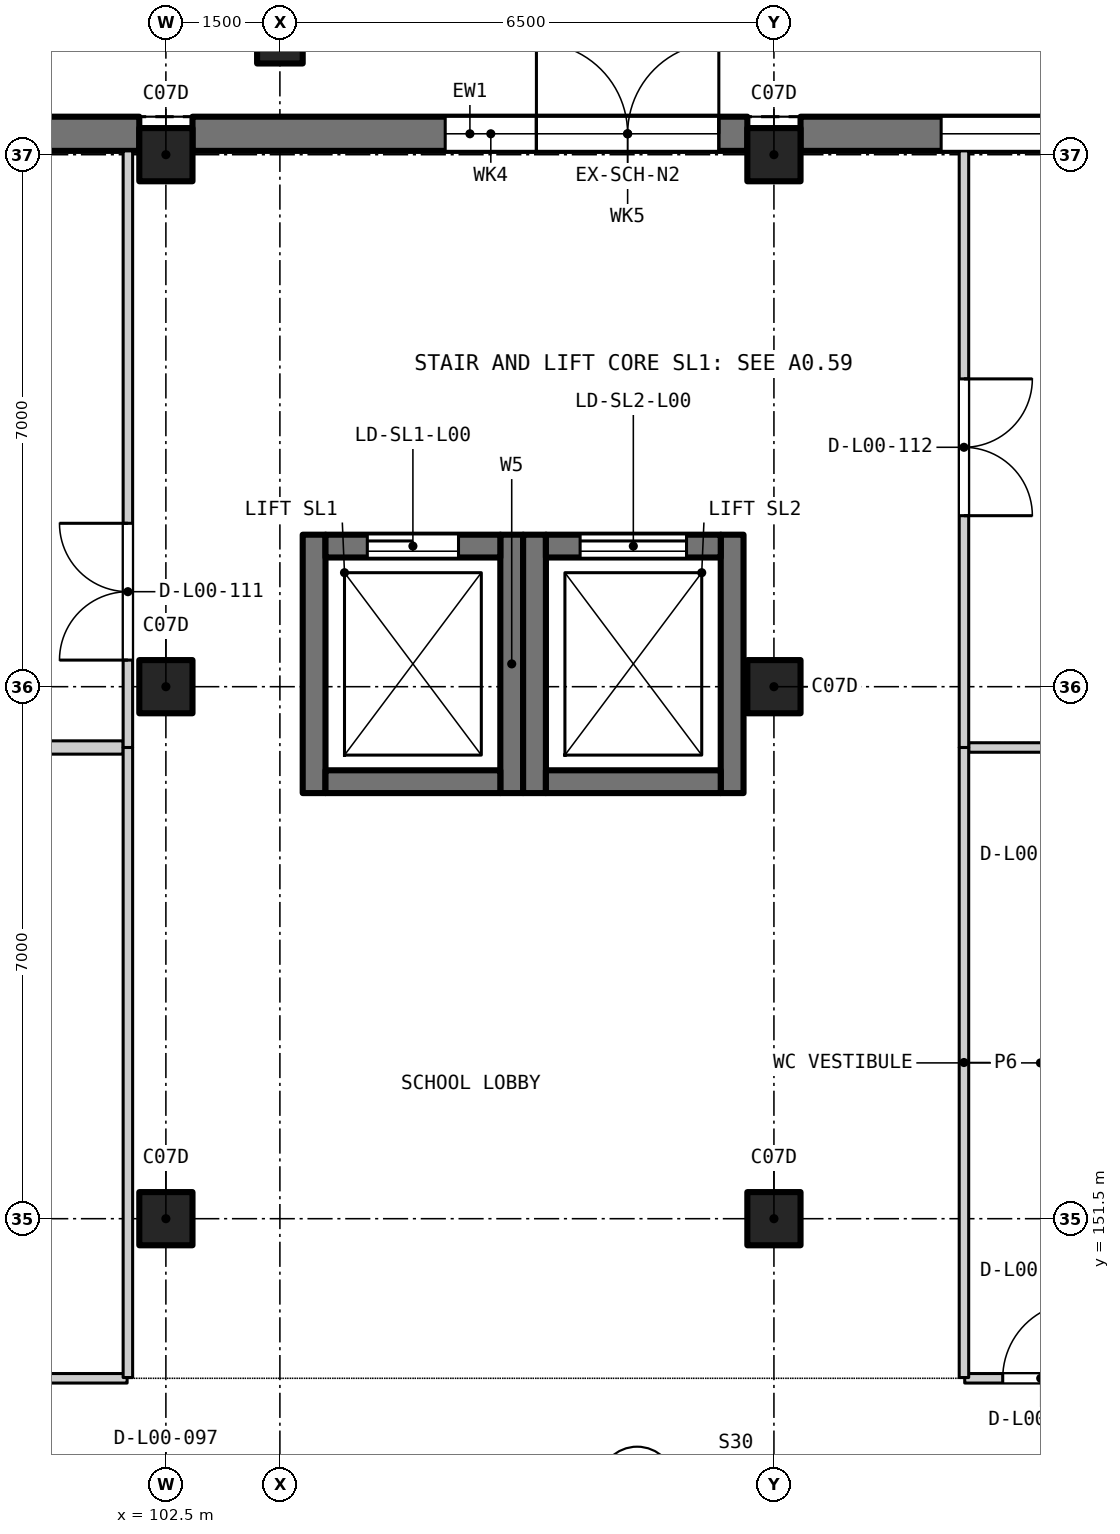
"""IFC4 building model, lengths in metres.
Left out: names, types, materials, properties, quantities, classifications, styles, units other than length and angle.
Written with IfcOpenShell. Run it as: python <this file> out.ifc"""

import sys

from ifc_helpers import new_model, si_unit, direction, frame, frame_2d, origin, origin_2d, place, context, subcontext, project, spatial, rectangle, extrude, element, fill, save


model = new_model("IFC4")
c1 = context("Model", 3, precision=1e-05, world=origin(), true_north=direction((0.0, 1.0)))
c2 = subcontext(c1, "Body", "Model", "MODEL_VIEW")
j1 = project(units=[si_unit("LENGTHUNIT", "METRE"), si_unit("PLANEANGLEUNIT", "RADIAN")], contexts=[c1])
p1 = place(None, origin())
s1 = spatial("IfcSite", under=j1, at=p1, CompositionType="ELEMENT")
p2 = place(p1, origin())
s2 = spatial("IfcBuilding", under=s1, at=p2, CompositionType="ELEMENT")
p3 = place(p2, origin())
s3 = spatial("IfcBuildingStorey", under=s2, at=p3, CompositionType="ELEMENT", Elevation=0.0)
for number, where, z_axis, x_axis in (
    (1, (102.5, 151.5, -1.4), (0.0, 0.0, 1.0), (1.0, 0.0, 0.0)),
    (2, (102.5, 158.5, -1.4), (0.0, 0.0, 1.0), (1.0, 0.0, 0.0)),
    (3, (102.5, 165.5, -1.4), (0.0, 0.0, 1.0), (1.0, 0.0, 0.0)),
    (4, (110.5, 151.5, -1.4), (0.0, 0.0, 1.0), (1.0, 0.0, 0.0)),
    (5, (110.5, 158.5, -1.4), (0.0, 0.0, 1.0), (1.0, 0.0, 0.0)),
    (6, (110.5, 165.5, -1.4), (0.0, 0.0, 1.0), (1.0, 0.0, 0.0)),
):
    element("IfcColumn", number, at=place(p3, frame(where, z_axis=z_axis, x_axis=x_axis)), inside=s3, PredefinedType="COLUMN", context=c2, shape_type="SweptSolid", body=[
        extrude(rectangle(XDim=0.7, YDim=0.7, at=origin_2d()), origin(), (0.0, 0.0, 1.0), 7.4),
    ])
p4 = place(p3, frame((104.0, 167.0, -0.3), z_axis=(0.0, 0.0, 1.0), x_axis=(1.0, 0.0, 0.0)))
e7 = element("IfcColumn", 7, at=p4, inside=s3, PredefinedType="COLUMN", context=c2, shape_type="SweptSolid", body=[
    extrude(rectangle(XDim=0.6, YDim=0.6, at=origin_2d()), origin(), (0.0, 0.0, 1.0), 6.15),
])
for number, where, z_axis, x_axis in (
    (8, (104.45, 157.1, -1.4), (0.0, 0.0, 1.0), (0.0, 1.0, 0.0)),
    (9, (107.05, 157.1, -1.4), (0.0, 0.0, 1.0), (0.0, 1.0, 0.0)),
):
    element("IfcWall", number, at=place(p3, frame(where, z_axis=z_axis, x_axis=x_axis)), inside=s3, PredefinedType="SHEAR", context=c2, shape_type="SweptSolid", body=[
        extrude(rectangle(XDim=3.4, YDim=0.3, at=frame_2d((1.7, 0.0))), origin(), (0.0, 0.0, 1.0), 7.4),
    ])
p5 = place(p3, frame((104.6, 157.25, -1.4), z_axis=(0.0, 0.0, 1.0), x_axis=(1.0, 0.0, 0.0)))
e10 = element("IfcWall", 10, at=p5, inside=s3, PredefinedType="SHEAR", context=c2, shape_type="SweptSolid", body=[
    extrude(rectangle(XDim=2.3, YDim=0.3, at=frame_2d((1.15, 0.0))), origin(), (0.0, 0.0, 1.0), 7.4),
])
p6 = place(p3, frame((104.6, 160.35, -1.4), z_axis=(0.0, 0.0, 1.0), x_axis=(1.0, 0.0, 0.0)))
e11 = element("IfcWall", 11, at=p6, inside=s3, PredefinedType="SHEAR", context=c2, shape_type="SweptSolid", body=[
    extrude(rectangle(XDim=2.3, YDim=0.3, at=frame_2d((1.15, 0.0))), origin(), (0.0, 0.0, 1.0), 7.4),
])
p7 = place(p6, frame((0.55, 0.0, 1.4)))
e12 = element("IfcOpeningElement", 12, at=p7, cuts=e11, PredefinedType="OPENING", context=c2, shape_type="SweptSolid", body=[
    extrude(rectangle(XDim=1.2, YDim=2.1, at=frame_2d((0.6, 1.05))), frame((0.0, 0.16, 0.0), z_axis=(0.0, -1.0, 0.0), x_axis=(1.0, 0.0, 0.0)), (0.0, 0.0, 1.0), 0.32),
])
for number, where, z_axis, x_axis in (
    (13, (107.35, 157.1, -1.4), (0.0, 0.0, 1.0), (0.0, 1.0, 0.0)),
    (14, (109.95, 157.1, -1.4), (0.0, 0.0, 1.0), (0.0, 1.0, 0.0)),
):
    element("IfcWall", number, at=place(p3, frame(where, z_axis=z_axis, x_axis=x_axis)), inside=s3, PredefinedType="SHEAR", context=c2, shape_type="SweptSolid", body=[
        extrude(rectangle(XDim=3.4, YDim=0.3, at=frame_2d((1.7, 0.0))), origin(), (0.0, 0.0, 1.0), 7.4),
    ])
p8 = place(p3, frame((107.5, 157.25, -1.4), z_axis=(0.0, 0.0, 1.0), x_axis=(1.0, 0.0, 0.0)))
e15 = element("IfcWall", 15, at=p8, inside=s3, PredefinedType="SHEAR", context=c2, shape_type="SweptSolid", body=[
    extrude(rectangle(XDim=2.3, YDim=0.3, at=frame_2d((1.15, 0.0))), origin(), (0.0, 0.0, 1.0), 7.4),
])
p9 = place(p3, frame((107.5, 160.35, -1.4), z_axis=(0.0, 0.0, 1.0), x_axis=(1.0, 0.0, 0.0)))
e16 = element("IfcWall", 16, at=p9, inside=s3, PredefinedType="SHEAR", context=c2, shape_type="SweptSolid", body=[
    extrude(rectangle(XDim=2.3, YDim=0.3, at=frame_2d((1.15, 0.0))), origin(), (0.0, 0.0, 1.0), 7.4),
])
p10 = place(p9, frame((0.45, 0.0, 1.4)))
e17 = element("IfcOpeningElement", 17, at=p10, cuts=e16, PredefinedType="OPENING", context=c2, shape_type="SweptSolid", body=[
    extrude(rectangle(XDim=1.4, YDim=2.1, at=frame_2d((0.7, 1.05))), frame((0.0, 0.16, 0.0), z_axis=(0.0, -1.0, 0.0), x_axis=(1.0, 0.0, 0.0)), (0.0, 0.0, 1.0), 0.32),
])
p11 = place(p3, frame((94.85, 165.775, 0.0), z_axis=(0.0, 0.0, 1.0), x_axis=(1.0, 0.0, 0.0)))
e18 = element("IfcWall", 18, at=p11, inside=s3, PredefinedType="SOLIDWALL", context=c2, shape_type="SweptSolid", body=[
    extrude(rectangle(XDim=7.3, YDim=0.45, at=frame_2d((3.65, 0.0))), origin(), (0.0, 0.0, 1.0), 4.9),
])
p12 = place(p11, frame((2.95, 0.0, 0.0)))
e19 = element("IfcOpeningElement", 19, at=p12, cuts=e18, PredefinedType="OPENING", context=c2, shape_type="SweptSolid", body=[
    extrude(rectangle(XDim=2.4, YDim=2.4, at=frame_2d((1.2, 1.2))), frame((0.0, 0.235, 0.0), z_axis=(0.0, -1.0, 0.0), x_axis=(1.0, 0.0, 0.0)), (0.0, 0.0, 1.0), 0.47),
])
p13 = place(p11, frame((2.95, 0.0, 2.5)))
e20 = element("IfcOpeningElement", 20, at=p13, cuts=e18, PredefinedType="OPENING", context=c2, shape_type="SweptSolid", body=[
    extrude(rectangle(XDim=2.4, YDim=0.6, at=frame_2d((1.2, 0.3))), frame((0.0, 0.235, 0.0), z_axis=(0.0, -1.0, 0.0), x_axis=(1.0, 0.0, 0.0)), (0.0, 0.0, 1.0), 0.47),
])
p14 = place(p11, frame((1.75, 0.0, 0.4)))
e21 = element("IfcOpeningElement", 21, at=p14, cuts=e18, PredefinedType="OPENING", context=c2, shape_type="SweptSolid", body=[
    extrude(rectangle(XDim=1.2, YDim=3.0, at=frame_2d((0.6, 1.5))), frame((0.0, 0.235, 0.0), z_axis=(0.0, -1.0, 0.0), x_axis=(1.0, 0.0, 0.0)), (0.0, 0.0, 1.0), 0.47),
])
p15 = place(p3, frame((102.85, 165.775, 0.0), z_axis=(0.0, 0.0, 1.0), x_axis=(1.0, 0.0, 0.0)))
e22 = element("IfcWall", 22, at=p15, inside=s3, PredefinedType="SOLIDWALL", context=c2, shape_type="SweptSolid", body=[
    extrude(rectangle(XDim=7.3, YDim=0.45, at=frame_2d((3.65, 0.0))), origin(), (0.0, 0.0, 1.0), 4.9),
])
p16 = place(p15, frame((4.525, 0.0, 0.0)))
e23 = element("IfcOpeningElement", 23, at=p16, cuts=e22, PredefinedType="OPENING", context=c2, shape_type="SweptSolid", body=[
    extrude(rectangle(XDim=2.4, YDim=2.4, at=frame_2d((1.2, 1.2))), frame((0.0, 0.235, 0.0), z_axis=(0.0, -1.0, 0.0), x_axis=(1.0, 0.0, 0.0)), (0.0, 0.0, 1.0), 0.47),
])
p17 = place(p15, frame((4.525, 0.0, 2.5)))
e24 = element("IfcOpeningElement", 24, at=p17, cuts=e22, PredefinedType="OPENING", context=c2, shape_type="SweptSolid", body=[
    extrude(rectangle(XDim=2.4, YDim=0.6, at=frame_2d((1.2, 0.3))), frame((0.0, 0.235, 0.0), z_axis=(0.0, -1.0, 0.0), x_axis=(1.0, 0.0, 0.0)), (0.0, 0.0, 1.0), 0.47),
])
p18 = place(p15, frame((3.325, 0.0, 0.4)))
e25 = element("IfcOpeningElement", 25, at=p18, cuts=e22, PredefinedType="OPENING", context=c2, shape_type="SweptSolid", body=[
    extrude(rectangle(XDim=1.2, YDim=3.0, at=frame_2d((0.6, 1.5))), frame((0.0, 0.235, 0.0), z_axis=(0.0, -1.0, 0.0), x_axis=(1.0, 0.0, 0.0)), (0.0, 0.0, 1.0), 0.47),
])
p19 = place(p3, frame((110.85, 165.775, 0.0), z_axis=(0.0, 0.0, 1.0), x_axis=(1.0, 0.0, 0.0)))
e26 = element("IfcWall", 26, at=p19, inside=s3, PredefinedType="SOLIDWALL", context=c2, shape_type="SweptSolid", body=[
    extrude(rectangle(XDim=7.3, YDim=0.45, at=frame_2d((3.65, 0.0))), origin(), (0.0, 0.0, 1.0), 4.9),
])
p20 = place(p19, frame((1.85, 0.0, 0.9)))
e27 = element("IfcOpeningElement", 27, at=p20, cuts=e26, PredefinedType="OPENING", context=c2, shape_type="SweptSolid", body=[
    extrude(rectangle(XDim=3.6, YDim=1.6, at=frame_2d((1.8, 0.8))), frame((0.0, 0.235, 0.0), z_axis=(0.0, -1.0, 0.0), x_axis=(1.0, 0.0, 0.0)), (0.0, 0.0, 1.0), 0.47),
])
p21 = place(p3, frame((89.61, 149.4, 0.0), z_axis=(0.0, 0.0, 1.0), x_axis=(1.0, 0.0, 0.0)))
e28 = element("IfcWall", 28, at=p21, inside=s3, PredefinedType="PARTITIONING", context=c2, shape_type="SweptSolid", body=[
    extrude(rectangle(XDim=12.38, YDim=0.125, at=frame_2d((6.19, 0.0))), origin(), (0.0, 0.0, 1.0), 5.7),
])
p22 = place(p21, frame((5.7, 0.0, 0.0)))
e29 = element("IfcOpeningElement", 29, at=p22, cuts=e28, PredefinedType="OPENING", context=c2, shape_type="SweptSolid", body=[
    extrude(rectangle(XDim=1.0, YDim=2.1, at=frame_2d((0.5, 1.05))), frame((0.0, 0.073, 0.0), z_axis=(0.0, -1.0, 0.0), x_axis=(1.0, 0.0, 0.0)), (0.0, 0.0, 1.0), 0.145),
])
p23 = place(p3, frame((113.01, 149.4, 0.0), z_axis=(0.0, 0.0, 1.0), x_axis=(1.0, 0.0, 0.0)))
e30 = element("IfcWall", 30, at=p23, inside=s3, PredefinedType="PARTITIONING", context=c2, shape_type="SweptSolid", body=[
    extrude(rectangle(XDim=1.99, YDim=0.125, at=frame_2d((0.995, 0.0))), origin(), (0.0, 0.0, 1.0), 5.7),
])
p24 = place(p23, frame((0.5, 0.0, 0.0)))
e31 = element("IfcOpeningElement", 31, at=p24, cuts=e30, PredefinedType="OPENING", context=c2, shape_type="SweptSolid", body=[
    extrude(rectangle(XDim=1.0, YDim=2.1, at=frame_2d((0.5, 1.05))), frame((0.0, 0.073, 0.0), z_axis=(0.0, -1.0, 0.0), x_axis=(1.0, 0.0, 0.0)), (0.0, 0.0, 1.0), 0.145),
])
p25 = place(p3, frame((89.663, 157.7, 0.0), z_axis=(0.0, 0.0, 1.0), x_axis=(1.0, 0.0, 0.0)))
e32 = element("IfcWall", 32, at=p25, inside=s3, PredefinedType="PARTITIONING", context=c2, shape_type="SweptSolid", body=[
    extrude(rectangle(XDim=12.275, YDim=0.175, at=frame_2d((6.137, 0.0))), origin(), (0.0, 0.0, 1.0), 5.7),
])
p26 = place(p3, frame((113.062, 157.7, 0.0), z_axis=(0.0, 0.0, 1.0), x_axis=(1.0, 0.0, 0.0)))
e33 = element("IfcWall", 33, at=p26, inside=s3, PredefinedType="PARTITIONING", context=c2, shape_type="SweptSolid", body=[
    extrude(rectangle(XDim=1.938, YDim=0.125, at=frame_2d((0.969, 0.0))), origin(), (0.0, 0.0, 1.0), 5.7),
])
p27 = place(p3, frame((102.0, 149.41, 0.0), z_axis=(0.0, 0.0, 1.0), x_axis=(0.0, 1.0, 0.0)))
e34 = element("IfcWall", 34, at=p27, inside=s3, PredefinedType="PARTITIONING", context=c2, shape_type="SweptSolid", body=[
    extrude(rectangle(XDim=8.29, YDim=0.125, at=frame_2d((4.145, 0.0))), origin(), (0.0, 0.0, 1.0), 5.7),
])
p28 = place(p3, frame((102.0, 157.7, 0.0), z_axis=(0.0, 0.0, 1.0), x_axis=(0.0, 1.0, 0.0)))
e35 = element("IfcWall", 35, at=p28, inside=s3, PredefinedType="PARTITIONING", context=c2, shape_type="SweptSolid", body=[
    extrude(rectangle(XDim=7.85, YDim=0.125, at=frame_2d((3.925, 0.0))), origin(), (0.0, 0.0, 1.0), 5.7),
])
p29 = place(p28, frame((1.15, 0.0, 0.0)))
e36 = element("IfcOpeningElement", 36, at=p29, cuts=e35, PredefinedType="OPENING", context=c2, shape_type="SweptSolid", body=[
    extrude(rectangle(XDim=1.8, YDim=2.1, at=frame_2d((0.9, 1.05))), frame((0.0, 0.073, 0.0), z_axis=(0.0, -1.0, 0.0), x_axis=(1.0, 0.0, 0.0)), (0.0, 0.0, 1.0), 0.145),
])
p30 = place(p3, frame((113.0, 149.41, 0.0), z_axis=(0.0, 0.0, 1.0), x_axis=(0.0, 1.0, 0.0)))
e37 = element("IfcWall", 37, at=p30, inside=s3, PredefinedType="PARTITIONING", context=c2, shape_type="SweptSolid", body=[
    extrude(rectangle(XDim=8.29, YDim=0.125, at=frame_2d((4.145, 0.0))), origin(), (0.0, 0.0, 1.0), 5.7),
])
p31 = place(p3, frame((113.0, 157.7, 0.0), z_axis=(0.0, 0.0, 1.0), x_axis=(0.0, 1.0, 0.0)))
e38 = element("IfcWall", 38, at=p31, inside=s3, PredefinedType="PARTITIONING", context=c2, shape_type="SweptSolid", body=[
    extrude(rectangle(XDim=7.85, YDim=0.125, at=frame_2d((3.925, 0.0))), origin(), (0.0, 0.0, 1.0), 5.7),
])
p32 = place(p31, frame((3.05, 0.0, 0.0)))
e39 = element("IfcOpeningElement", 39, at=p32, cuts=e38, PredefinedType="OPENING", context=c2, shape_type="SweptSolid", body=[
    extrude(rectangle(XDim=1.8, YDim=2.1, at=frame_2d((0.9, 1.05))), frame((0.0, 0.073, 0.0), z_axis=(0.0, -1.0, 0.0), x_axis=(1.0, 0.0, 0.0)), (0.0, 0.0, 1.0), 0.145),
])
p33 = place(p16, origin())
e40 = element("IfcDoor", 40, at=p33, inside=s3, OperationType="DOUBLE_DOOR_DOUBLE_SWING", PredefinedType="DOOR", context=c2, shape_type="SweptSolid", body=[
    extrude(rectangle(XDim=2.4, YDim=2.4, at=frame_2d((1.2, 1.2))), frame((0.0, 0.025, 0.0), z_axis=(0.0, -1.0, 0.0), x_axis=(1.0, 0.0, 0.0)), (0.0, 0.0, 1.0), 0.05),
])
fill(e23, e40)
p34 = place(p17, origin())
e41 = element("IfcWindow", 41, at=p34, inside=s3, PartitioningType="SINGLE_PANEL", PredefinedType="WINDOW", context=c2, shape_type="SweptSolid", body=[
    extrude(rectangle(XDim=2.4, YDim=0.6, at=frame_2d((1.2, 0.3))), frame((0.0, 0.025, 0.0), z_axis=(0.0, -1.0, 0.0), x_axis=(1.0, 0.0, 0.0)), (0.0, 0.0, 1.0), 0.06),
])
fill(e24, e41)
p35 = place(p18, origin())
e42 = element("IfcWindow", 42, at=p35, inside=s3, PartitioningType="SINGLE_PANEL", PredefinedType="WINDOW", context=c2, shape_type="SweptSolid", body=[
    extrude(rectangle(XDim=1.2, YDim=3.0, at=frame_2d((0.6, 1.5))), frame((0.0, 0.025, 0.0), z_axis=(0.0, -1.0, 0.0), x_axis=(1.0, 0.0, 0.0)), (0.0, 0.0, 1.0), 0.06),
])
fill(e25, e42)
p36 = place(p20, origin())
e43 = element("IfcWindow", 43, at=p36, inside=s3, PartitioningType="SINGLE_PANEL", PredefinedType="WINDOW", context=c2, shape_type="SweptSolid", body=[
    extrude(rectangle(XDim=3.6, YDim=1.6, at=frame_2d((1.8, 0.8))), frame((0.0, -0.125, 0.0), z_axis=(0.0, -1.0, 0.0), x_axis=(1.0, 0.0, 0.0)), (0.0, 0.0, 1.0), 0.06),
])
fill(e27, e43)
p37 = place(p24, origin())
e44 = element("IfcDoor", 44, at=p37, inside=s3, OperationType="SINGLE_SWING_RIGHT", PredefinedType="DOOR", context=c2, shape_type="SweptSolid", body=[
    extrude(rectangle(XDim=1.0, YDim=2.1, at=frame_2d((0.5, 1.05))), frame((0.0, 0.025, 0.0), z_axis=(0.0, -1.0, 0.0), x_axis=(1.0, 0.0, 0.0)), (0.0, 0.0, 1.0), 0.05),
])
fill(e31, e44)
p38 = place(p29, origin())
e45 = element("IfcDoor", 45, at=p38, inside=s3, OperationType="DOUBLE_DOOR_SINGLE_SWING", PredefinedType="DOOR", context=c2, shape_type="SweptSolid", body=[
    extrude(rectangle(XDim=1.8, YDim=2.1, at=frame_2d((0.9, 1.05))), frame((0.0, 0.025, 0.0), z_axis=(0.0, -1.0, 0.0), x_axis=(1.0, 0.0, 0.0)), (0.0, 0.0, 1.0), 0.05),
])
fill(e36, e45)
p39 = place(p32, frame((1.8, 0.0, 0.0), z_axis=(0.0, 0.0, 1.0), x_axis=(-1.0, 0.0, 0.0)))
e46 = element("IfcDoor", 46, at=p39, inside=s3, OperationType="DOUBLE_DOOR_SINGLE_SWING", PredefinedType="DOOR", context=c2, shape_type="SweptSolid", body=[
    extrude(rectangle(XDim=1.8, YDim=2.1, at=frame_2d((0.9, 1.05))), frame((0.0, 0.025, 0.0), z_axis=(0.0, -1.0, 0.0), x_axis=(1.0, 0.0, 0.0)), (0.0, 0.0, 1.0), 0.05),
])
fill(e39, e46)
p40 = place(p7, origin())
e47 = element("IfcDoor", 47, at=p40, inside=s3, OperationType="SLIDING_TO_LEFT", PredefinedType="DOOR", context=c2, shape_type="SweptSolid", body=[
    extrude(rectangle(XDim=1.2, YDim=2.1, at=frame_2d((0.6, 1.05))), frame((0.0, 0.025, 0.0), z_axis=(0.0, -1.0, 0.0), x_axis=(1.0, 0.0, 0.0)), (0.0, 0.0, 1.0), 0.05),
])
fill(e12, e47)
p41 = place(p10, origin())
e48 = element("IfcDoor", 48, at=p41, inside=s3, OperationType="DOUBLE_DOOR_SLIDING", PredefinedType="DOOR", context=c2, shape_type="SweptSolid", body=[
    extrude(rectangle(XDim=1.4, YDim=2.1, at=frame_2d((0.7, 1.05))), frame((0.0, 0.025, 0.0), z_axis=(0.0, -1.0, 0.0), x_axis=(1.0, 0.0, 0.0)), (0.0, 0.0, 1.0), 0.05),
])
fill(e17, e48)
save(model, sys.argv[1])
